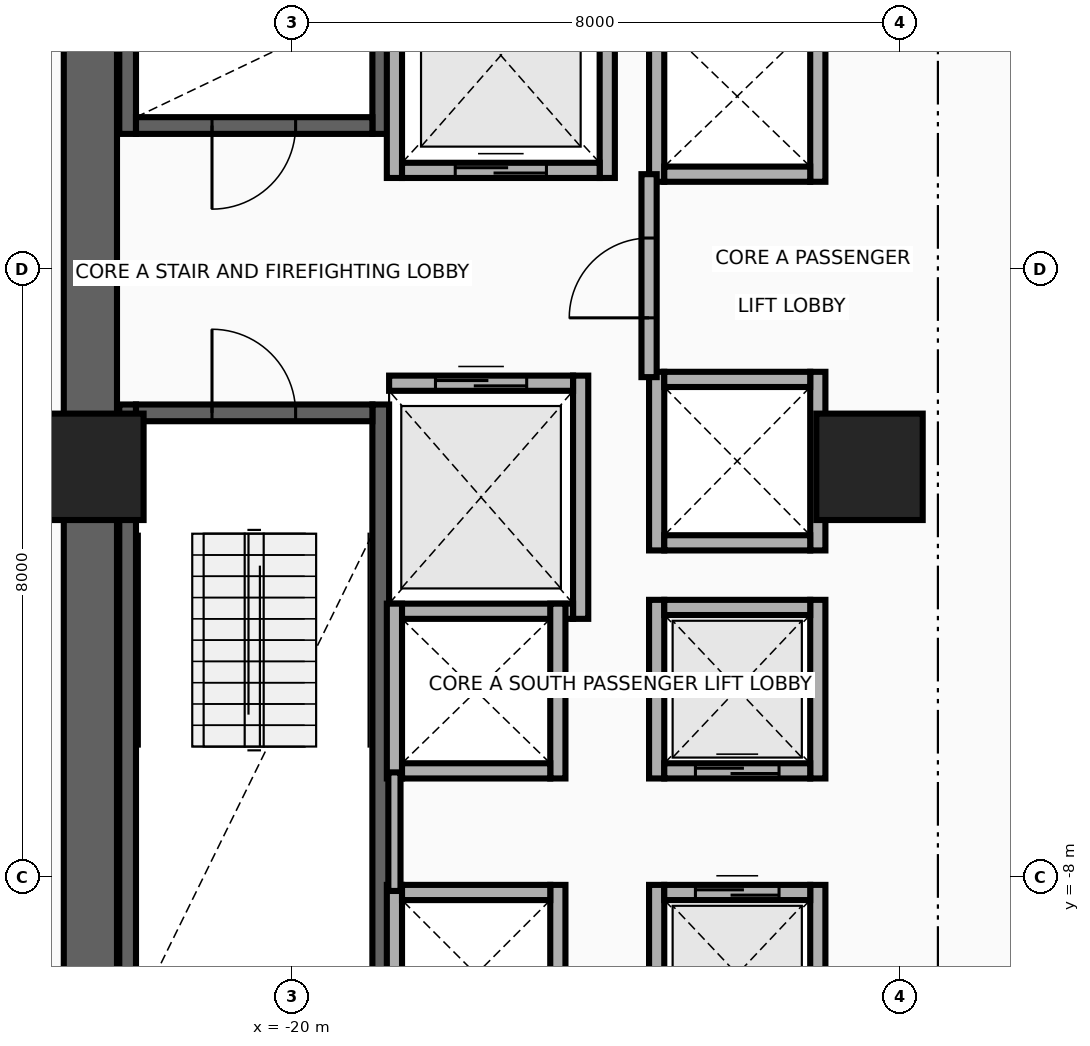
"""IFC4 building model, lengths in metres.
Left out: names, types, materials, properties, quantities, classifications, styles, units other than length and angle.
Written with IfcOpenShell. Run it as: python <this file> out.ifc"""

import sys

from ifc_helpers import new_model, si_unit, direction, frame, frame_2d, origin, origin_2d, place, context, subcontext, project, spatial, rectangle, extrude, source, transform, mapped, element, fill, save


model = new_model("IFC4")
c1 = context("Model", 3, precision=1e-05, world=origin(), true_north=direction((0.0, 1.0)))
c2 = subcontext(c1, "Body", "Model", "MODEL_VIEW")
j1 = project(units=[si_unit("LENGTHUNIT", "METRE"), si_unit("PLANEANGLEUNIT", "RADIAN")], contexts=[c1])
p1 = place(None, origin())
s1 = spatial("IfcSite", under=j1, at=p1, CompositionType="ELEMENT")
p2 = place(p1, origin())
s2 = spatial("IfcBuilding", under=s1, at=p2, CompositionType="ELEMENT")
p3 = place(p2, frame((0.0, 0.0, 55.6)))
s3 = spatial("IfcBuildingStorey", under=s2, at=p3, CompositionType="ELEMENT", Elevation=55.6)
for number, where, z_axis, x_axis in (
    (1, (-22.16, 1.78, 0.0), (0.0, 0.0, 1.0), (0.0, 1.0, 0.0)),
    (2, (-18.83, 1.78, 0.0), (0.0, 0.0, 1.0), (0.0, 1.0, 0.0)),
):
    element("IfcWall", number, at=place(p3, frame(where, z_axis=z_axis, x_axis=x_axis)), inside=s3, PredefinedType="SHEAR", context=c2, shape_type="SweptSolid", body=[
        extrude(rectangle(XDim=8.67, YDim=0.22, at=frame_2d((4.335, 0.0))), origin(), (0.0, 0.0, 1.0), 3.46),
    ])
p4 = place(p3, frame((-22.05, 1.89, 0.0), z_axis=(0.0, 0.0, 1.0), x_axis=(1.0, 0.0, 0.0)))
e3 = element("IfcWall", 3, at=p4, inside=s3, PredefinedType="SHEAR", context=c2, shape_type="SweptSolid", body=[
    extrude(rectangle(XDim=3.11, YDim=0.22, at=frame_2d((1.555, 0.0))), origin(), (0.0, 0.0, 1.0), 3.46),
])
p5 = place(p4, frame((1.0, 0.0, 0.0)))
e4 = element("IfcOpeningElement", 4, at=p5, cuts=e3, PredefinedType="OPENING", context=c2, shape_type="SweptSolid", body=[
    extrude(rectangle(XDim=1.1, YDim=2.15, at=frame_2d((0.55, 1.075))), frame((0.0, 0.125, 0.0), z_axis=(0.0, -1.0, 0.0), x_axis=(1.0, 0.0, 0.0)), (0.0, 0.0, 1.0), 0.25),
])
for number, where, z_axis, x_axis in (
    (5, (-22.16, -10.45, 0.0), (0.0, 0.0, 1.0), (0.0, 1.0, 0.0)),
    (6, (-18.83, -10.45, 0.0), (0.0, 0.0, 1.0), (0.0, 1.0, 0.0)),
):
    element("IfcWall", number, at=place(p3, frame(where, z_axis=z_axis, x_axis=x_axis)), inside=s3, PredefinedType="SHEAR", context=c2, shape_type="SweptSolid", body=[
        extrude(rectangle(XDim=8.67, YDim=0.22, at=frame_2d((4.335, 0.0))), origin(), (0.0, 0.0, 1.0), 3.46),
    ])
p6 = place(p3, frame((-22.05, -1.89, 0.0), z_axis=(0.0, 0.0, 1.0), x_axis=(1.0, 0.0, 0.0)))
e7 = element("IfcWall", 7, at=p6, inside=s3, PredefinedType="SHEAR", context=c2, shape_type="SweptSolid", body=[
    extrude(rectangle(XDim=3.11, YDim=0.22, at=frame_2d((1.555, 0.0))), origin(), (0.0, 0.0, 1.0), 3.46),
])
p7 = place(p6, frame((1.0, 0.0, 0.0)))
e8 = element("IfcOpeningElement", 8, at=p7, cuts=e7, PredefinedType="OPENING", context=c2, shape_type="SweptSolid", body=[
    extrude(rectangle(XDim=1.1, YDim=2.15, at=frame_2d((0.55, 1.075))), frame((0.0, 0.125, 0.0), z_axis=(0.0, -1.0, 0.0), x_axis=(1.0, 0.0, 0.0)), (0.0, 0.0, 1.0), 0.25),
])
p8 = place(p3, frame((-22.65, -11.15, 0.0), z_axis=(0.0, 0.0, 1.0), x_axis=(0.0, 1.0, 0.0)))
e9 = element("IfcWall", 9, at=p8, inside=s3, PredefinedType="SHEAR", context=c2, shape_type="SweptSolid", body=[
    extrude(rectangle(XDim=22.3, YDim=0.7, at=frame_2d((11.15, 0.0))), origin(), (0.0, 0.0, 1.0), 3.46),
])
m1 = source(origin(), c2, "Body", "SweptSolid", [
    extrude(rectangle(XDim=1.4, YDim=1.4, at=origin_2d()), origin(), (0.0, 0.0, 1.0), 3.7),
])
for number, where, z_axis, x_axis in (
    (10, (-22.65, -2.6, 0.0), (0.0, 0.0, 1.0), (1.0, 0.0, 0.0)),
    (11, (-12.4, -2.6, 0.0), (0.0, 0.0, 1.0), (1.0, 0.0, 0.0)),
):
    element("IfcColumn", number, at=place(p3, frame(where, z_axis=z_axis, x_axis=x_axis)), inside=s3, PredefinedType="COLUMN", context=c2, shape_type="MappedRepresentation", body=[
        mapped(m1, transform((0.0, 0.0, 0.0), x_axis=(1.0, 0.0, 0.0), y_axis=(0.0, 1.0, 0.0), z_axis=(0.0, 0.0, 1.0), scale=1.0)),
    ])
for number, where, z_axis, x_axis in (
    (12, (-18.65, 1.2, 0.0), (0.0, 0.0, 1.0), (0.0, 1.0, 0.0)),
    (13, (-15.85, 1.2, 0.0), (0.0, 0.0, 1.0), (0.0, 1.0, 0.0)),
):
    element("IfcWall", number, at=place(p3, frame(where, z_axis=z_axis, x_axis=x_axis)), inside=s3, PredefinedType="MOVABLE", context=c2, shape_type="SweptSolid", body=[
        extrude(rectangle(XDim=3.225, YDim=0.2, at=frame_2d((1.613, 0.0))), origin(), (0.0, 0.0, 1.0), 3.46),
    ])
p9 = place(p3, frame((-18.55, 1.3, 0.0), z_axis=(0.0, 0.0, 1.0), x_axis=(1.0, 0.0, 0.0)))
e14 = element("IfcWall", 14, at=p9, inside=s3, PredefinedType="MOVABLE", context=c2, shape_type="SweptSolid", body=[
    extrude(rectangle(XDim=2.6, YDim=0.2, at=frame_2d((1.3, 0.0))), origin(), (0.0, 0.0, 1.0), 3.46),
])
p10 = place(p9, frame((0.7, 0.0, 0.0)))
e15 = element("IfcOpeningElement", 15, at=p10, cuts=e14, PredefinedType="OPENING", context=c2, shape_type="SweptSolid", body=[
    extrude(rectangle(XDim=1.2, YDim=2.1, at=frame_2d((0.6, 1.05))), frame((0.0, 0.115, 0.0), z_axis=(0.0, -1.0, 0.0), x_axis=(1.0, 0.0, 0.0)), (0.0, 0.0, 1.0), 0.23),
])
p11 = place(p3, frame((-16.2, -4.6, 0.0), z_axis=(0.0, 0.0, 1.0), x_axis=(0.0, 1.0, 0.0)))
e16 = element("IfcWall", 16, at=p11, inside=s3, PredefinedType="MOVABLE", context=c2, shape_type="SweptSolid", body=[
    extrude(rectangle(XDim=3.2, YDim=0.2, at=frame_2d((1.6, 0.0))), origin(), (0.0, 0.0, 1.0), 3.46),
])
p12 = place(p3, frame((-18.72, -4.5, 0.0), z_axis=(0.0, 0.0, 1.0), x_axis=(1.0, 0.0, 0.0)))
e17 = element("IfcWall", 17, at=p12, inside=s3, PredefinedType="MOVABLE", context=c2, shape_type="SweptSolid", body=[
    extrude(rectangle(XDim=2.42, YDim=0.2, at=frame_2d((1.21, 0.0))), origin(), (0.0, 0.0, 1.0), 3.46),
])
p13 = place(p3, frame((-18.72, -1.5, 0.0), z_axis=(0.0, 0.0, 1.0), x_axis=(1.0, 0.0, 0.0)))
e18 = element("IfcWall", 18, at=p13, inside=s3, PredefinedType="MOVABLE", context=c2, shape_type="SweptSolid", body=[
    extrude(rectangle(XDim=2.42, YDim=0.2, at=frame_2d((1.21, 0.0))), origin(), (0.0, 0.0, 1.0), 3.46),
])
p14 = place(p13, frame((0.61, 0.0, 0.0)))
e19 = element("IfcOpeningElement", 19, at=p14, cuts=e18, PredefinedType="OPENING", context=c2, shape_type="SweptSolid", body=[
    extrude(rectangle(XDim=1.2, YDim=2.1, at=frame_2d((0.6, 1.05))), frame((0.0, 0.115, 0.0), z_axis=(0.0, -1.0, 0.0), x_axis=(1.0, 0.0, 0.0)), (0.0, 0.0, 1.0), 0.23),
])
for number, where, z_axis, x_axis in (
    (20, (-15.2, -10.45, 0.0), (0.0, 0.0, 1.0), (0.0, 1.0, 0.0)),
    (21, (-13.08, -10.45, 0.0), (0.0, 0.0, 1.0), (0.0, 1.0, 0.0)),
):
    element("IfcWall", number, at=place(p3, frame(where, z_axis=z_axis, x_axis=x_axis)), inside=s3, PredefinedType="MOVABLE", context=c2, shape_type="SweptSolid", body=[
        extrude(rectangle(XDim=2.35, YDim=0.2, at=frame_2d((1.175, 0.0))), origin(), (0.0, 0.0, 1.0), 2.583),
    ])
p15 = place(p3, frame((-15.1, -8.2, 0.0), z_axis=(0.0, 0.0, 1.0), x_axis=(1.0, 0.0, 0.0)))
e22 = element("IfcWall", 22, at=p15, inside=s3, PredefinedType="MOVABLE", context=c2, shape_type="SweptSolid", body=[
    extrude(rectangle(XDim=1.92, YDim=0.2, at=frame_2d((0.96, 0.0))), origin(), (0.0, 0.0, 1.0), 3.46),
])
p16 = place(p15, frame((0.41, 0.0, 0.0)))
e23 = element("IfcOpeningElement", 23, at=p16, cuts=e22, PredefinedType="OPENING", context=c2, shape_type="SweptSolid", body=[
    extrude(rectangle(XDim=1.1, YDim=2.1, at=frame_2d((0.55, 1.05))), frame((0.0, 0.115, 0.0), z_axis=(0.0, -1.0, 0.0), x_axis=(1.0, 0.0, 0.0)), (0.0, 0.0, 1.0), 0.23),
])
for number, where, z_axis, x_axis in (
    (24, (-15.2, -6.7, 0.0), (0.0, 0.0, 1.0), (0.0, 1.0, 0.0)),
    (25, (-13.08, -6.7, 0.0), (0.0, 0.0, 1.0), (0.0, 1.0, 0.0)),
):
    element("IfcWall", number, at=place(p3, frame(where, z_axis=z_axis, x_axis=x_axis)), inside=s3, PredefinedType="MOVABLE", context=c2, shape_type="SweptSolid", body=[
        extrude(rectangle(XDim=2.35, YDim=0.2, at=frame_2d((1.175, 0.0))), origin(), (0.0, 0.0, 1.0), 3.46),
    ])
p17 = place(p3, frame((-15.1, -6.6, 0.0), z_axis=(0.0, 0.0, 1.0), x_axis=(1.0, 0.0, 0.0)))
e26 = element("IfcWall", 26, at=p17, inside=s3, PredefinedType="MOVABLE", context=c2, shape_type="SweptSolid", body=[
    extrude(rectangle(XDim=1.92, YDim=0.2, at=frame_2d((0.96, 0.0))), origin(), (0.0, 0.0, 1.0), 3.46),
])
p18 = place(p17, frame((0.41, 0.0, 0.0)))
e27 = element("IfcOpeningElement", 27, at=p18, cuts=e26, PredefinedType="OPENING", context=c2, shape_type="SweptSolid", body=[
    extrude(rectangle(XDim=1.1, YDim=2.1, at=frame_2d((0.55, 1.05))), frame((0.0, 0.115, 0.0), z_axis=(0.0, -1.0, 0.0), x_axis=(1.0, 0.0, 0.0)), (0.0, 0.0, 1.0), 0.23),
])
p19 = place(p3, frame((-15.1, -4.45, 0.0), z_axis=(0.0, 0.0, 1.0), x_axis=(1.0, 0.0, 0.0)))
e28 = element("IfcWall", 28, at=p19, inside=s3, PredefinedType="MOVABLE", context=c2, shape_type="SweptSolid", body=[
    extrude(rectangle(XDim=1.92, YDim=0.2, at=frame_2d((0.96, 0.0))), origin(), (0.0, 0.0, 1.0), 3.46),
])
for number, where, z_axis, x_axis in (
    (29, (-18.65, -10.45, 0.0), (0.0, 0.0, 1.0), (0.0, 1.0, 0.0)),
    (30, (-16.5, -10.45, 0.0), (0.0, 0.0, 1.0), (0.0, 1.0, 0.0)),
):
    element("IfcWall", number, at=place(p3, frame(where, z_axis=z_axis, x_axis=x_axis)), inside=s3, PredefinedType="MOVABLE", context=c2, shape_type="SweptSolid", body=[
        extrude(rectangle(XDim=2.35, YDim=0.2, at=frame_2d((1.175, 0.0))), origin(), (0.0, 0.0, 1.0), 2.583),
    ])
p20 = place(p3, frame((-18.55, -8.2, 0.0), z_axis=(0.0, 0.0, 1.0), x_axis=(1.0, 0.0, 0.0)))
e31 = element("IfcWall", 31, at=p20, inside=s3, PredefinedType="MOVABLE", context=c2, shape_type="SweptSolid", body=[
    extrude(rectangle(XDim=1.95, YDim=0.2, at=frame_2d((0.975, 0.0))), origin(), (0.0, 0.0, 1.0), 3.46),
])
for number, where, z_axis, x_axis in (
    (32, (-15.2, 1.15, 0.0), (0.0, 0.0, 1.0), (0.0, 1.0, 0.0)),
    (33, (-13.08, 1.15, 0.0), (0.0, 0.0, 1.0), (0.0, 1.0, 0.0)),
):
    element("IfcWall", number, at=place(p3, frame(where, z_axis=z_axis, x_axis=x_axis)), inside=s3, PredefinedType="MOVABLE", context=c2, shape_type="SweptSolid", body=[
        extrude(rectangle(XDim=2.25, YDim=0.2, at=frame_2d((1.125, 0.0))), origin(), (0.0, 0.0, 1.0), 3.46),
    ])
p21 = place(p3, frame((-15.1, 1.25, 0.0), z_axis=(0.0, 0.0, 1.0), x_axis=(1.0, 0.0, 0.0)))
e34 = element("IfcWall", 34, at=p21, inside=s3, PredefinedType="MOVABLE", context=c2, shape_type="SweptSolid", body=[
    extrude(rectangle(XDim=1.92, YDim=0.2, at=frame_2d((0.96, 0.0))), origin(), (0.0, 0.0, 1.0), 3.46),
])
for number, where, z_axis, x_axis in (
    (35, (-18.65, -6.7, 0.0), (0.0, 0.0, 1.0), (0.0, 1.0, 0.0)),
    (36, (-16.5, -6.7, 0.0), (0.0, 0.0, 1.0), (0.0, 1.0, 0.0)),
):
    element("IfcWall", number, at=place(p3, frame(where, z_axis=z_axis, x_axis=x_axis)), inside=s3, PredefinedType="MOVABLE", context=c2, shape_type="SweptSolid", body=[
        extrude(rectangle(XDim=2.3, YDim=0.2, at=frame_2d((1.15, 0.0))), origin(), (0.0, 0.0, 1.0), 3.46),
    ])
p22 = place(p3, frame((-18.55, -6.6, 0.0), z_axis=(0.0, 0.0, 1.0), x_axis=(1.0, 0.0, 0.0)))
e37 = element("IfcWall", 37, at=p22, inside=s3, PredefinedType="MOVABLE", context=c2, shape_type="SweptSolid", body=[
    extrude(rectangle(XDim=1.95, YDim=0.2, at=frame_2d((0.975, 0.0))), origin(), (0.0, 0.0, 1.0), 3.46),
])
for number, where, z_axis, x_axis in (
    (38, (-15.2, -3.7, 0.0), (0.0, 0.0, 1.0), (0.0, 1.0, 0.0)),
    (39, (-13.08, -3.7, 0.0), (0.0, 0.0, 1.0), (0.0, 1.0, 0.0)),
):
    element("IfcWall", number, at=place(p3, frame(where, z_axis=z_axis, x_axis=x_axis)), inside=s3, PredefinedType="MOVABLE", context=c2, shape_type="SweptSolid", body=[
        extrude(rectangle(XDim=2.35, YDim=0.2, at=frame_2d((1.175, 0.0))), origin(), (0.0, 0.0, 1.0), 3.46),
    ])
for number, where, z_axis, x_axis in (
    (40, (-15.1, -3.6, 0.0), (0.0, 0.0, 1.0), (1.0, 0.0, 0.0)),
    (41, (-15.1, -1.45, 0.0), (0.0, 0.0, 1.0), (1.0, 0.0, 0.0)),
):
    element("IfcWall", number, at=place(p3, frame(where, z_axis=z_axis, x_axis=x_axis)), inside=s3, PredefinedType="MOVABLE", context=c2, shape_type="SweptSolid", body=[
        extrude(rectangle(XDim=1.92, YDim=0.2, at=frame_2d((0.96, 0.0))), origin(), (0.0, 0.0, 1.0), 3.46),
    ])
p23 = place(p3, frame((-15.3, -1.42, 0.0), z_axis=(0.0, 0.0, 1.0), x_axis=(0.0, 1.0, 0.0)))
e42 = element("IfcWall", 42, at=p23, inside=s3, PredefinedType="PARTITIONING", context=c2, shape_type="SweptSolid", body=[
    extrude(rectangle(XDim=2.67, YDim=0.2, at=frame_2d((1.335, 0.0))), origin(), (0.0, 0.0, 1.0), 3.46),
])
p24 = place(p23, frame((0.78, 0.0, 0.0)))
e43 = element("IfcOpeningElement", 43, at=p24, cuts=e42, PredefinedType="OPENING", context=c2, shape_type="SweptSolid", body=[
    extrude(rectangle(XDim=1.05, YDim=2.15, at=frame_2d((0.525, 1.075))), frame((0.0, 0.115, 0.0), z_axis=(0.0, -1.0, 0.0), x_axis=(1.0, 0.0, 0.0)), (0.0, 0.0, 1.0), 0.23),
])
p25 = place(p3, frame((-18.65, -8.18, 0.0), z_axis=(0.0, 0.0, 1.0), x_axis=(0.0, 1.0, 0.0)))
e44 = element("IfcWall", 44, at=p25, inside=s3, PredefinedType="PARTITIONING", context=c2, shape_type="SweptSolid", body=[
    extrude(rectangle(XDim=1.56, YDim=0.16, at=frame_2d((0.78, 0.0))), origin(), (0.0, 0.0, 1.0), 3.46),
])
p26 = place(p10, origin())
e45 = element("IfcDoor", 45, at=p26, inside=s3, OperationType="DOUBLE_DOOR_SLIDING", PredefinedType="DOOR", context=c2, shape_type="SweptSolid", body=[
    extrude(rectangle(XDim=1.2, YDim=2.1, at=frame_2d((0.6, 1.05))), frame((0.0, 0.025, 0.0), z_axis=(0.0, -1.0, 0.0), x_axis=(1.0, 0.0, 0.0)), (0.0, 0.0, 1.0), 0.05),
])
fill(e15, e45)
p27 = place(p14, origin())
e46 = element("IfcDoor", 46, at=p27, inside=s3, OperationType="DOUBLE_DOOR_SLIDING", PredefinedType="DOOR", context=c2, shape_type="SweptSolid", body=[
    extrude(rectangle(XDim=1.2, YDim=2.1, at=frame_2d((0.6, 1.05))), frame((0.0, 0.025, 0.0), z_axis=(0.0, -1.0, 0.0), x_axis=(1.0, 0.0, 0.0)), (0.0, 0.0, 1.0), 0.05),
])
fill(e19, e46)
p28 = place(p16, origin())
e47 = element("IfcDoor", 47, at=p28, inside=s3, OperationType="DOUBLE_DOOR_SLIDING", PredefinedType="DOOR", context=c2, shape_type="SweptSolid", body=[
    extrude(rectangle(XDim=1.1, YDim=2.1, at=frame_2d((0.55, 1.05))), frame((0.0, 0.025, 0.0), z_axis=(0.0, -1.0, 0.0), x_axis=(1.0, 0.0, 0.0)), (0.0, 0.0, 1.0), 0.05),
])
fill(e23, e47)
p29 = place(p18, origin())
e48 = element("IfcDoor", 48, at=p29, inside=s3, OperationType="DOUBLE_DOOR_SLIDING", PredefinedType="DOOR", context=c2, shape_type="SweptSolid", body=[
    extrude(rectangle(XDim=1.1, YDim=2.1, at=frame_2d((0.55, 1.05))), frame((0.0, 0.025, 0.0), z_axis=(0.0, -1.0, 0.0), x_axis=(1.0, 0.0, 0.0)), (0.0, 0.0, 1.0), 0.05),
])
fill(e27, e48)
p30 = place(p24, origin())
e49 = element("IfcDoor", 49, at=p30, inside=s3, OperationType="SINGLE_SWING_RIGHT", PredefinedType="DOOR", context=c2, shape_type="SweptSolid", body=[
    extrude(rectangle(XDim=1.05, YDim=2.15, at=frame_2d((0.525, 1.075))), frame((0.0, 0.025, 0.0), z_axis=(0.0, -1.0, 0.0), x_axis=(1.0, 0.0, 0.0)), (0.0, 0.0, 1.0), 0.05),
])
fill(e43, e49)
p31 = place(p5, frame((1.1, 0.0, 0.0), z_axis=(0.0, 0.0, 1.0), x_axis=(-1.0, 0.0, 0.0)))
e50 = element("IfcDoor", 50, at=p31, inside=s3, OperationType="SINGLE_SWING_LEFT", PredefinedType="DOOR", context=c2, shape_type="SweptSolid", body=[
    extrude(rectangle(XDim=1.1, YDim=2.15, at=frame_2d((0.55, 1.075))), frame((0.0, 0.025, 0.0), z_axis=(0.0, -1.0, 0.0), x_axis=(1.0, 0.0, 0.0)), (0.0, 0.0, 1.0), 0.05),
])
fill(e4, e50)
p32 = place(p7, origin())
e51 = element("IfcDoor", 51, at=p32, inside=s3, OperationType="SINGLE_SWING_RIGHT", PredefinedType="DOOR", context=c2, shape_type="SweptSolid", body=[
    extrude(rectangle(XDim=1.1, YDim=2.15, at=frame_2d((0.55, 1.075))), frame((0.0, 0.025, 0.0), z_axis=(0.0, -1.0, 0.0), x_axis=(1.0, 0.0, 0.0)), (0.0, 0.0, 1.0), 0.05),
])
fill(e8, e51)
save(model, sys.argv[1])
